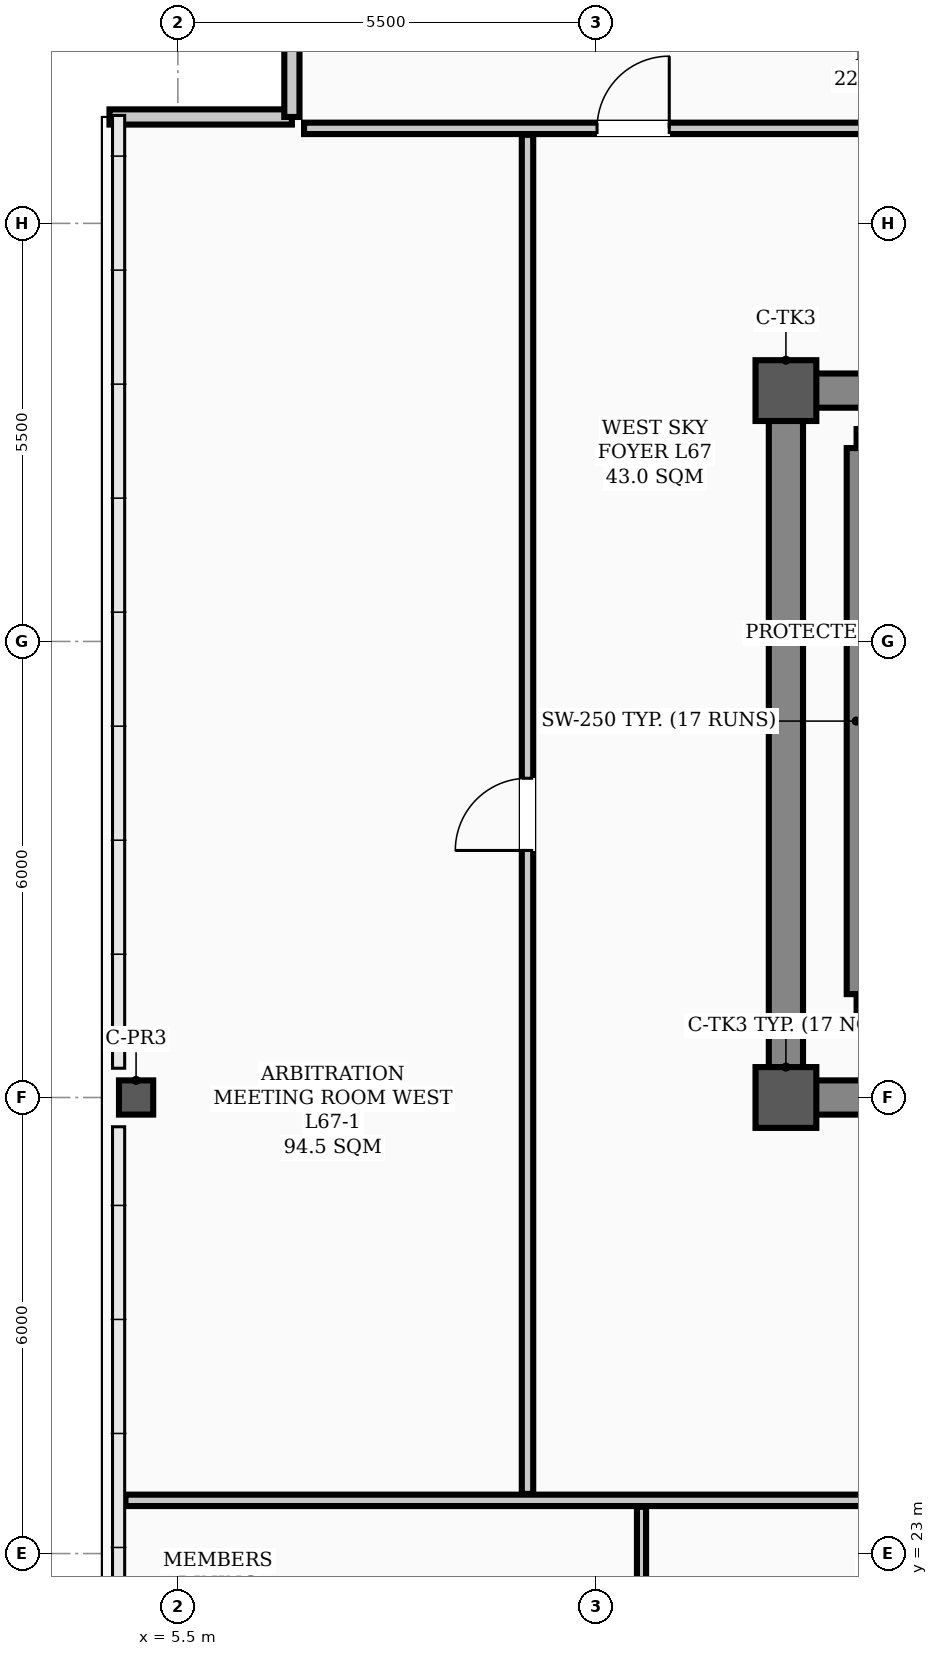
"""IFC4 building model, lengths in metres.
Left out: names, types, materials, properties, quantities, classifications, styles, units other than length and angle.
Written with IfcOpenShell. Run it as: python <this file> out.ifc"""

import sys

from ifc_helpers import new_model, si_unit, direction, frame, frame_2d, origin, origin_2d, place, context, subcontext, project, spatial, rectangle, hollow_rectangle, extrude, element, fill, save


model = new_model("IFC4")
c1 = context("Model", 3, precision=1e-05, world=origin(), true_north=direction((0.0, 1.0)))
c2 = subcontext(c1, "Body", "Model", "MODEL_VIEW")
j1 = project(units=[si_unit("LENGTHUNIT", "METRE"), si_unit("PLANEANGLEUNIT", "RADIAN")], contexts=[c1])
p1 = place(None, origin())
s1 = spatial("IfcSite", under=j1, at=p1, CompositionType="ELEMENT")
p2 = place(p1, origin())
s2 = spatial("IfcBuilding", under=s1, at=p2, CompositionType="ELEMENT")
p3 = place(p2, frame((0.0, 0.0, 269.6)))
s3 = spatial("IfcBuildingStorey", under=s2, at=p3, CompositionType="ELEMENT", Elevation=269.6)
for number, where, z_axis, x_axis in (
    (1, (13.5, 29.0, 0.0), (0.0, 0.0, 1.0), (1.0, 0.0, 0.0)),
    (2, (13.5, 38.3, 0.0), (0.0, 0.0, 1.0), (1.0, 0.0, 0.0)),
):
    element("IfcColumn", number, at=place(p3, frame(where, z_axis=z_axis, x_axis=x_axis)), inside=s3, PredefinedType="COLUMN", context=c2, shape_type="SweptSolid", body=[
        extrude(hollow_rectangle(XDim=0.8, YDim=0.8, WallThickness=0.032, InnerFilletRadius=0.016, OuterFilletRadius=0.048, at=origin_2d()), origin(), (0.0, 0.0, 1.0), 3.9),
    ])
p4 = place(p3, frame((4.95, 29.0, 0.0), z_axis=(0.0, 0.0, 1.0), x_axis=(1.0, 0.0, 0.0)))
e3 = element("IfcColumn", 3, at=p4, inside=s3, PredefinedType="COLUMN", context=c2, shape_type="SweptSolid", body=[
    extrude(hollow_rectangle(XDim=0.45, YDim=0.45, WallThickness=0.022, InnerFilletRadius=0.022, OuterFilletRadius=0.044, at=origin_2d()), origin(), (0.0, 0.0, 1.0), 3.9),
])
p5 = place(p3, frame((4.6, 41.9, 0.0), z_axis=(0.0, 0.0, 1.0), x_axis=(1.0, 0.0, 0.0)))
e4 = element("IfcWall", 4, at=p5, inside=s3, PredefinedType="PARAPET", context=c2, shape_type="SweptSolid", body=[
    extrude(rectangle(XDim=2.4, YDim=0.2, at=frame_2d((1.2, 0.0))), origin(), (0.0, 0.0, 1.0), 1.2),
])
p6 = place(p3, frame((7.0, 41.9, 0.0), z_axis=(0.0, 0.0, 1.0), x_axis=(0.0, 1.0, 0.0)))
e5 = element("IfcWall", 5, at=p6, inside=s3, PredefinedType="PARAPET", context=c2, shape_type="SweptSolid", body=[
    extrude(rectangle(XDim=2.4, YDim=0.2, at=frame_2d((1.2, 0.0))), origin(), (0.0, 0.0, 1.0), 1.2),
])
p7 = place(p3, frame((13.5, 29.0, 0.0), z_axis=(0.0, 0.0, 1.0), x_axis=(1.0, 0.0, 0.0)))
e6 = element("IfcWall", 6, at=p7, inside=s3, PredefinedType="SHEAR", context=c2, shape_type="SweptSolid", body=[
    extrude(rectangle(XDim=30.5, YDim=0.45, at=frame_2d((15.25, 0.0))), origin(), (0.0, 0.0, 1.0), 3.72),
])
p8 = place(p7, frame((1.75, 0.0, 0.0)))
e7 = element("IfcOpeningElement", 7, at=p8, cuts=e6, PredefinedType="OPENING", context=c2, shape_type="SweptSolid", body=[
    extrude(rectangle(XDim=1.1, YDim=2.08, at=frame_2d((0.55, 1.04))), frame((0.0, 0.235, 0.0), z_axis=(0.0, -1.0, 0.0), x_axis=(1.0, 0.0, 0.0)), (0.0, 0.0, 1.0), 0.47),
])
p9 = place(p7, frame((26.7, 0.0, 0.0)))
e8 = element("IfcOpeningElement", 8, at=p9, cuts=e6, PredefinedType="OPENING", context=c2, shape_type="SweptSolid", body=[
    extrude(rectangle(XDim=1.1, YDim=2.08, at=frame_2d((0.55, 1.04))), frame((0.0, 0.235, 0.0), z_axis=(0.0, -1.0, 0.0), x_axis=(1.0, 0.0, 0.0)), (0.0, 0.0, 1.0), 0.47),
])
p10 = place(p7, frame((6.8, 0.0, 0.0)))
e9 = element("IfcOpeningElement", 9, at=p10, cuts=e6, PredefinedType="OPENING", context=c2, shape_type="SweptSolid", body=[
    extrude(rectangle(XDim=1.1, YDim=2.08, at=frame_2d((0.55, 1.04))), frame((0.0, 0.235, 0.0), z_axis=(0.0, -1.0, 0.0), x_axis=(1.0, 0.0, 0.0)), (0.0, 0.0, 1.0), 0.47),
])
p11 = place(p7, frame((13.2, 0.0, 0.0)))
e10 = element("IfcOpeningElement", 10, at=p11, cuts=e6, PredefinedType="OPENING", context=c2, shape_type="SweptSolid", body=[
    extrude(rectangle(XDim=1.6, YDim=2.08, at=frame_2d((0.8, 1.04))), frame((0.0, 0.235, 0.0), z_axis=(0.0, -1.0, 0.0), x_axis=(1.0, 0.0, 0.0)), (0.0, 0.0, 1.0), 0.47),
])
p12 = place(p7, frame((19.6, 0.0, 0.0)))
e11 = element("IfcOpeningElement", 11, at=p12, cuts=e6, PredefinedType="OPENING", context=c2, shape_type="SweptSolid", body=[
    extrude(rectangle(XDim=0.9, YDim=2.08, at=frame_2d((0.45, 1.04))), frame((0.0, 0.235, 0.0), z_axis=(0.0, -1.0, 0.0), x_axis=(1.0, 0.0, 0.0)), (0.0, 0.0, 1.0), 0.47),
])
p13 = place(p7, frame((21.6, 0.0, 0.0)))
e12 = element("IfcOpeningElement", 12, at=p13, cuts=e6, PredefinedType="OPENING", context=c2, shape_type="SweptSolid", body=[
    extrude(rectangle(XDim=0.9, YDim=2.08, at=frame_2d((0.45, 1.04))), frame((0.0, 0.235, 0.0), z_axis=(0.0, -1.0, 0.0), x_axis=(1.0, 0.0, 0.0)), (0.0, 0.0, 1.0), 0.47),
])
p14 = place(p3, frame((13.5, 38.3, 0.0), z_axis=(0.0, 0.0, 1.0), x_axis=(1.0, 0.0, 0.0)))
e13 = element("IfcWall", 13, at=p14, inside=s3, PredefinedType="SHEAR", context=c2, shape_type="SweptSolid", body=[
    extrude(rectangle(XDim=30.5, YDim=0.45, at=frame_2d((15.25, 0.0))), origin(), (0.0, 0.0, 1.0), 3.72),
])
p15 = place(p3, frame((13.5, 29.35, 0.0), z_axis=(0.0, 0.0, 1.0), x_axis=(0.0, 1.0, 0.0)))
e14 = element("IfcWall", 14, at=p15, inside=s3, PredefinedType="SHEAR", context=c2, shape_type="SweptSolid", body=[
    extrude(rectangle(XDim=8.6, YDim=0.45, at=frame_2d((4.3, 0.0))), origin(), (0.0, 0.0, 1.0), 3.72),
])
p16 = place(p3, frame((14.43, 30.235, 0.0), z_axis=(0.0, 0.0, 1.0), x_axis=(1.0, 0.0, 0.0)))
e15 = element("IfcWall", 15, at=p16, inside=s3, PredefinedType="STANDARD", context=c2, shape_type="SweptSolid", body=[
    extrude(rectangle(XDim=3.34, YDim=0.25, at=frame_2d((1.67, 0.0))), origin(), (0.0, 0.0, 1.0), 3.72),
])
p17 = place(p16, frame((1.1, 0.0, 0.0)))
e16 = element("IfcOpeningElement", 16, at=p17, cuts=e15, PredefinedType="OPENING", context=c2, shape_type="SweptSolid", body=[
    extrude(rectangle(XDim=1.1, YDim=2.08, at=frame_2d((0.55, 1.04))), frame((0.0, 0.135, 0.0), z_axis=(0.0, -1.0, 0.0), x_axis=(1.0, 0.0, 0.0)), (0.0, 0.0, 1.0), 0.27),
])
p18 = place(p3, frame((14.43, 37.669, 0.0), z_axis=(0.0, 0.0, 1.0), x_axis=(1.0, 0.0, 0.0)))
e17 = element("IfcWall", 17, at=p18, inside=s3, PredefinedType="STANDARD", context=c2, shape_type="SweptSolid", body=[
    extrude(rectangle(XDim=3.34, YDim=0.25, at=frame_2d((1.67, 0.0))), origin(), (0.0, 0.0, 1.0), 3.72),
])
p19 = place(p3, frame((14.425, 30.36, 0.0), z_axis=(0.0, 0.0, 1.0), x_axis=(0.0, 1.0, 0.0)))
e18 = element("IfcWall", 18, at=p19, inside=s3, PredefinedType="STANDARD", context=c2, shape_type="SweptSolid", body=[
    extrude(rectangle(XDim=7.184, YDim=0.25, at=frame_2d((3.592, 0.0))), origin(), (0.0, 0.0, 1.0), 3.72),
])
p20 = place(p3, frame((4.81, 23.7, 0.0), z_axis=(0.0, 0.0, 1.0), x_axis=(1.0, 0.0, 0.0)))
e19 = element("IfcWall", 19, at=p20, inside=s3, PredefinedType="PARTITIONING", context=c2, shape_type="SweptSolid", body=[
    extrude(rectangle(XDim=40.88, YDim=0.15, at=frame_2d((20.44, 0.0))), origin(), (0.0, 0.0, 1.0), 3.2),
])
p21 = place(p20, frame((10.415, 0.0, 0.0)))
e20 = element("IfcOpeningElement", 20, at=p21, cuts=e19, PredefinedType="OPENING", context=c2, shape_type="SweptSolid", body=[
    extrude(rectangle(XDim=0.95, YDim=2.08, at=frame_2d((0.475, 1.04))), frame((0.0, 0.085, 0.0), z_axis=(0.0, -1.0, 0.0), x_axis=(1.0, 0.0, 0.0)), (0.0, 0.0, 1.0), 0.17),
])
p22 = place(p20, frame((16.015, 0.0, 0.0)))
e21 = element("IfcOpeningElement", 21, at=p22, cuts=e19, PredefinedType="OPENING", context=c2, shape_type="SweptSolid", body=[
    extrude(rectangle(XDim=0.95, YDim=2.08, at=frame_2d((0.475, 1.04))), frame((0.0, 0.085, 0.0), z_axis=(0.0, -1.0, 0.0), x_axis=(1.0, 0.0, 0.0)), (0.0, 0.0, 1.0), 0.17),
])
p23 = place(p20, frame((22.715, 0.0, 0.0)))
e22 = element("IfcOpeningElement", 22, at=p23, cuts=e19, PredefinedType="OPENING", context=c2, shape_type="SweptSolid", body=[
    extrude(rectangle(XDim=0.95, YDim=2.08, at=frame_2d((0.475, 1.04))), frame((0.0, 0.085, 0.0), z_axis=(0.0, -1.0, 0.0), x_axis=(1.0, 0.0, 0.0)), (0.0, 0.0, 1.0), 0.17),
])
p24 = place(p20, frame((29.415, 0.0, 0.0)))
e23 = element("IfcOpeningElement", 23, at=p24, cuts=e19, PredefinedType="OPENING", context=c2, shape_type="SweptSolid", body=[
    extrude(rectangle(XDim=0.95, YDim=2.08, at=frame_2d((0.475, 1.04))), frame((0.0, 0.085, 0.0), z_axis=(0.0, -1.0, 0.0), x_axis=(1.0, 0.0, 0.0)), (0.0, 0.0, 1.0), 0.17),
])
p25 = place(p20, frame((36.56, 0.0, 0.0)))
e24 = element("IfcOpeningElement", 24, at=p25, cuts=e19, PredefinedType="OPENING", context=c2, shape_type="SweptSolid", body=[
    extrude(rectangle(XDim=0.95, YDim=2.08, at=frame_2d((0.475, 1.04))), frame((0.0, 0.085, 0.0), z_axis=(0.0, -1.0, 0.0), x_axis=(1.0, 0.0, 0.0)), (0.0, 0.0, 1.0), 0.17),
])
p26 = place(p3, frame((7.16, 41.75, 0.0), z_axis=(0.0, 0.0, 1.0), x_axis=(1.0, 0.0, 0.0)))
e25 = element("IfcWall", 25, at=p26, inside=s3, PredefinedType="PARTITIONING", context=c2, shape_type="SweptSolid", body=[
    extrude(rectangle(XDim=36.18, YDim=0.15, at=frame_2d((18.09, 0.0))), origin(), (0.0, 0.0, 1.0), 3.2),
])
p27 = place(p26, frame((3.855, 0.0, 0.0)))
e26 = element("IfcOpeningElement", 26, at=p27, cuts=e25, PredefinedType="OPENING", context=c2, shape_type="SweptSolid", body=[
    extrude(rectangle(XDim=0.95, YDim=2.08, at=frame_2d((0.475, 1.04))), frame((0.0, 0.085, 0.0), z_axis=(0.0, -1.0, 0.0), x_axis=(1.0, 0.0, 0.0)), (0.0, 0.0, 1.0), 0.17),
])
p28 = place(p26, frame((13.165, 0.0, 0.0)))
e27 = element("IfcOpeningElement", 27, at=p28, cuts=e25, PredefinedType="OPENING", context=c2, shape_type="SweptSolid", body=[
    extrude(rectangle(XDim=0.95, YDim=2.08, at=frame_2d((0.475, 1.04))), frame((0.0, 0.085, 0.0), z_axis=(0.0, -1.0, 0.0), x_axis=(1.0, 0.0, 0.0)), (0.0, 0.0, 1.0), 0.17),
])
p29 = place(p26, frame((20.765, 0.0, 0.0)))
e28 = element("IfcOpeningElement", 28, at=p29, cuts=e25, PredefinedType="OPENING", context=c2, shape_type="SweptSolid", body=[
    extrude(rectangle(XDim=0.95, YDim=2.08, at=frame_2d((0.475, 1.04))), frame((0.0, 0.085, 0.0), z_axis=(0.0, -1.0, 0.0), x_axis=(1.0, 0.0, 0.0)), (0.0, 0.0, 1.0), 0.17),
])
p30 = place(p26, frame((28.365, 0.0, 0.0)))
e29 = element("IfcOpeningElement", 29, at=p30, cuts=e25, PredefinedType="OPENING", context=c2, shape_type="SweptSolid", body=[
    extrude(rectangle(XDim=0.95, YDim=2.08, at=frame_2d((0.475, 1.04))), frame((0.0, 0.085, 0.0), z_axis=(0.0, -1.0, 0.0), x_axis=(1.0, 0.0, 0.0)), (0.0, 0.0, 1.0), 0.17),
])
p31 = place(p26, frame((34.265, 0.0, 0.0)))
e30 = element("IfcOpeningElement", 30, at=p31, cuts=e25, PredefinedType="OPENING", context=c2, shape_type="SweptSolid", body=[
    extrude(rectangle(XDim=0.95, YDim=2.08, at=frame_2d((0.475, 1.04))), frame((0.0, 0.085, 0.0), z_axis=(0.0, -1.0, 0.0), x_axis=(1.0, 0.0, 0.0)), (0.0, 0.0, 1.0), 0.17),
])
p32 = place(p3, frame((10.1, 23.785, 0.0), z_axis=(0.0, 0.0, 1.0), x_axis=(0.0, 1.0, 0.0)))
e31 = element("IfcWall", 31, at=p32, inside=s3, PredefinedType="PARTITIONING", context=c2, shape_type="SweptSolid", body=[
    extrude(rectangle(XDim=17.88, YDim=0.15, at=frame_2d((8.94, 0.0))), origin(), (0.0, 0.0, 1.0), 3.1),
])
p33 = place(p32, frame((8.465, 0.0, 0.0)))
e32 = element("IfcOpeningElement", 32, at=p33, cuts=e31, PredefinedType="OPENING", context=c2, shape_type="SweptSolid", body=[
    extrude(rectangle(XDim=0.95, YDim=2.08, at=frame_2d((0.475, 1.04))), frame((0.0, 0.085, 0.0), z_axis=(0.0, -1.0, 0.0), x_axis=(1.0, 0.0, 0.0)), (0.0, 0.0, 1.0), 0.17),
])
p34 = place(p3, frame((11.6, 17.91, 0.0), z_axis=(0.0, 0.0, 1.0), x_axis=(0.0, 1.0, 0.0)))
e33 = element("IfcWall", 33, at=p34, inside=s3, PredefinedType="PARTITIONING", context=c2, shape_type="SweptSolid", body=[
    extrude(rectangle(XDim=5.705, YDim=0.12, at=frame_2d((2.853, 0.0))), origin(), (0.0, 0.0, 1.0), 3.72),
])
p35 = place(p34, frame((3.815, 0.0, 0.0)))
e34 = element("IfcOpeningElement", 34, at=p35, cuts=e33, PredefinedType="OPENING", context=c2, shape_type="SweptSolid", body=[
    extrude(rectangle(XDim=0.95, YDim=2.08, at=frame_2d((0.475, 1.04))), frame((0.0, 0.07, 0.0), z_axis=(0.0, -1.0, 0.0), x_axis=(1.0, 0.0, 0.0)), (0.0, 0.0, 1.0), 0.14),
])
p36 = place(p33, origin())
e35 = element("IfcDoor", 35, at=p36, inside=s3, OperationType="SINGLE_SWING_LEFT", PredefinedType="DOOR", context=c2, shape_type="SweptSolid", body=[
    extrude(rectangle(XDim=0.95, YDim=2.08, at=frame_2d((0.475, 1.04))), frame((0.0, 0.025, 0.0), z_axis=(0.0, -1.0, 0.0), x_axis=(1.0, 0.0, 0.0)), (0.0, 0.0, 1.0), 0.05),
])
fill(e32, e35)
p37 = place(p27, origin())
e36 = element("IfcDoor", 36, at=p37, inside=s3, OperationType="SINGLE_SWING_RIGHT", PredefinedType="DOOR", context=c2, shape_type="SweptSolid", body=[
    extrude(rectangle(XDim=0.95, YDim=2.08, at=frame_2d((0.475, 1.04))), frame((0.0, 0.025, 0.0), z_axis=(0.0, -1.0, 0.0), x_axis=(1.0, 0.0, 0.0)), (0.0, 0.0, 1.0), 0.05),
])
fill(e26, e36)
save(model, sys.argv[1])
